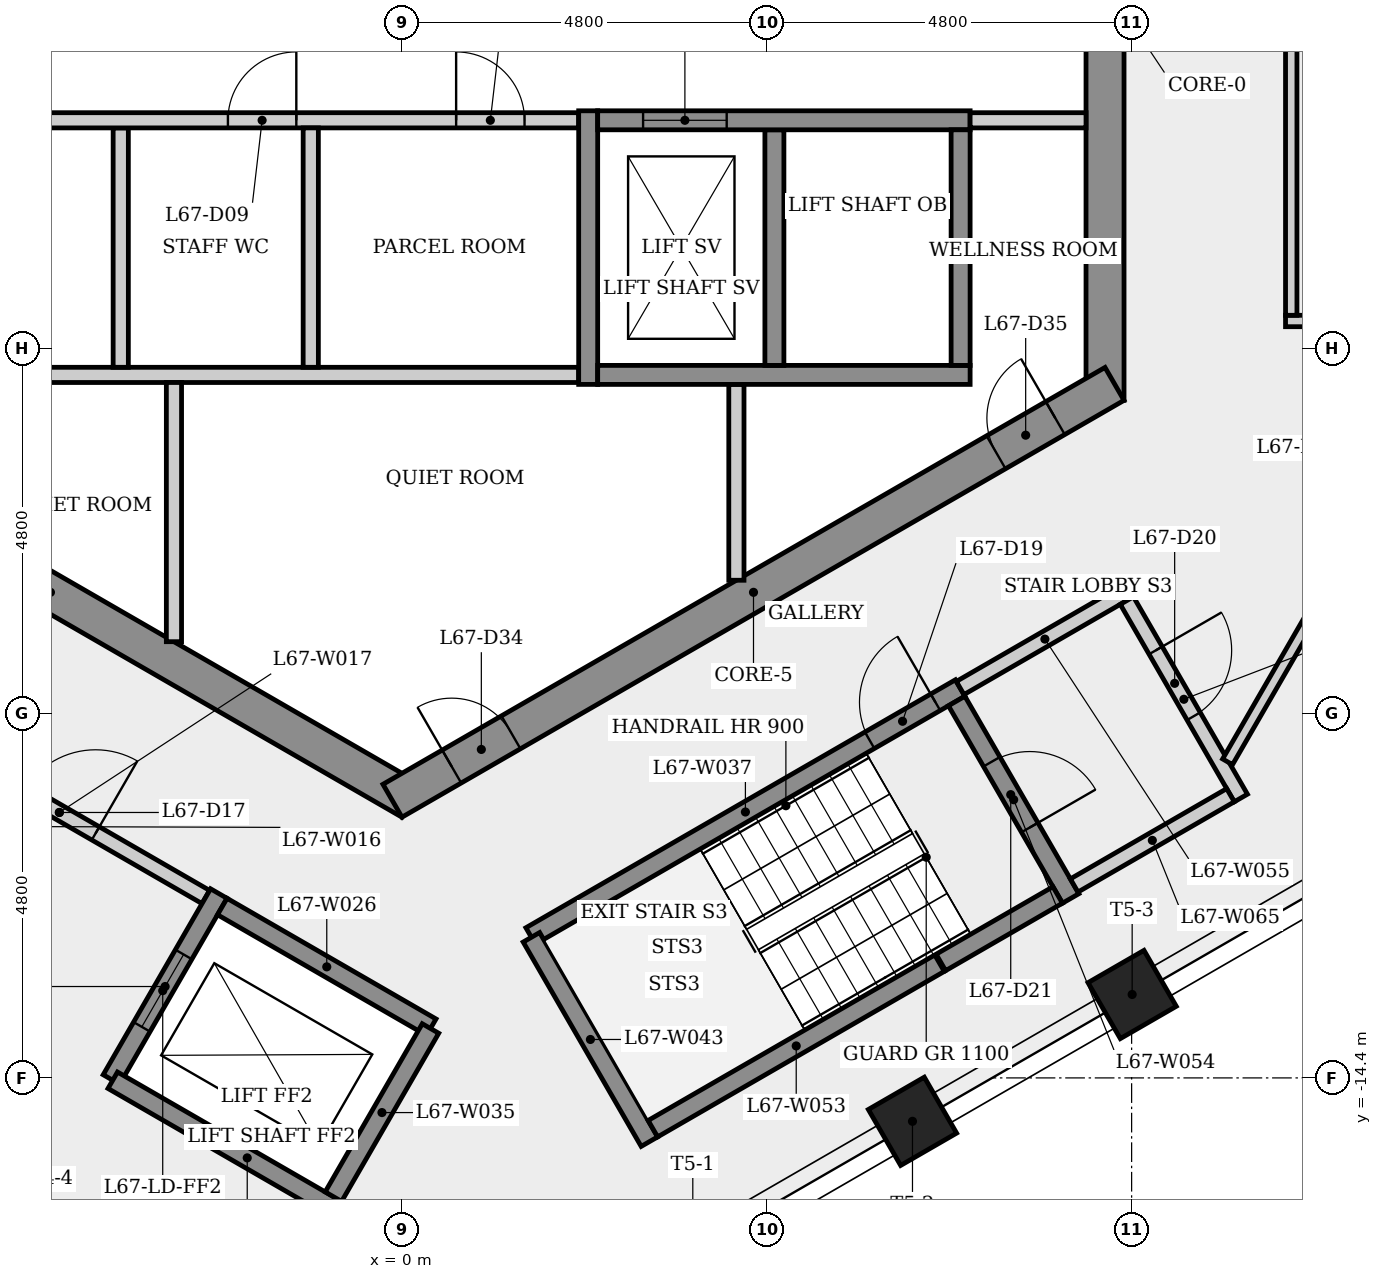
"""IFC4 building model, lengths in metres.
Left out: names, types, materials, properties, quantities, classifications, styles, units other than length and angle.
Written with IfcOpenShell. Run it as: python <this file> out.ifc"""

import sys

from ifc_helpers import new_model, si_unit, direction, frame, frame_2d, origin, origin_2d, place, context, subcontext, project, spatial, rectangle, extrude, element, fill, save


model = new_model("IFC4")
c1 = context("Model", 3, precision=1e-05, world=origin(), true_north=direction((0.0, 1.0)))
c2 = subcontext(c1, "Body", "Model", "MODEL_VIEW")
j1 = project(units=[si_unit("LENGTHUNIT", "METRE"), si_unit("PLANEANGLEUNIT", "RADIAN")], contexts=[c1])
p1 = place(None, origin())
s1 = spatial("IfcSite", under=j1, at=p1, CompositionType="ELEMENT")
p2 = place(p1, origin())
s2 = spatial("IfcBuilding", under=s1, at=p2, CompositionType="ELEMENT")
p3 = place(p2, frame((0.0, 0.0, 249.5)))
s3 = spatial("IfcBuildingStorey", under=s2, at=p3, CompositionType="ELEMENT", Elevation=249.5)
p4 = place(p3, frame((9.25, -5.485, 0.0), z_axis=(0.0, 0.0, 1.0), x_axis=(0.0, 1.0, 0.0)))
e1 = element("IfcWall", 1, at=p4, inside=s3, PredefinedType="SHEAR", context=c2, shape_type="SweptSolid", body=[
    extrude(rectangle(XDim=10.97, YDim=0.5, at=frame_2d((5.485, 0.0))), origin(), (0.0, 0.0, 1.0), 3.4),
])
p5 = place(p4, frame((4.685, 0.0, 0.0)))
e2 = element("IfcOpeningElement", 2, at=p5, cuts=e1, PredefinedType="OPENING", context=c2, shape_type="SweptSolid", body=[
    extrude(rectangle(XDim=1.6, YDim=2.1, at=frame_2d((0.8, 1.05))), frame((0.0, 0.26, 0.0), z_axis=(0.0, -1.0, 0.0), x_axis=(1.0, 0.0, 0.0)), (0.0, 0.0, 1.0), 0.52),
])
p6 = place(p3, frame((-9.375, -5.268, 0.0), z_axis=(0.0, 0.0, 1.0), x_axis=(0.866023993627, -0.500002442456, 0.0)))
e3 = element("IfcWall", 3, at=p6, inside=s3, PredefinedType="SHEAR", context=c2, shape_type="SweptSolid", body=[
    extrude(rectangle(XDim=10.97, YDim=0.5, at=frame_2d((5.485, 0.0))), origin(), (0.0, 0.0, 1.0), 3.4),
])
p7 = place(p6, frame((3.303, 0.0, 0.0)))
e4 = element("IfcOpeningElement", 4, at=p7, cuts=e3, PredefinedType="OPENING", context=c2, shape_type="SweptSolid", body=[
    extrude(rectangle(XDim=0.9, YDim=2.1, at=frame_2d((0.45, 1.05))), frame((0.0, 0.26, 0.0), z_axis=(0.0, -1.0, 0.0), x_axis=(1.0, 0.0, 0.0)), (0.0, 0.0, 1.0), 0.52),
])
p8 = place(p3, frame((-0.125, -10.753, 0.0), z_axis=(0.0, 0.0, 1.0), x_axis=(0.866023993627, 0.500002442456, 0.0)))
e5 = element("IfcWall", 5, at=p8, inside=s3, PredefinedType="SHEAR", context=c2, shape_type="SweptSolid", body=[
    extrude(rectangle(XDim=10.97, YDim=0.5, at=frame_2d((5.485, 0.0))), origin(), (0.0, 0.0, 1.0), 3.4),
])
p9 = place(p8, frame((0.9, 0.0, 0.0)))
e6 = element("IfcOpeningElement", 6, at=p9, cuts=e5, PredefinedType="OPENING", context=c2, shape_type="SweptSolid", body=[
    extrude(rectangle(XDim=0.9, YDim=2.1, at=frame_2d((0.45, 1.05))), frame((0.0, 0.26, 0.0), z_axis=(0.0, -1.0, 0.0), x_axis=(1.0, 0.0, 0.0)), (0.0, 0.0, 1.0), 0.52),
])
p10 = place(p8, frame((9.17, 0.0, 0.0)))
e7 = element("IfcOpeningElement", 7, at=p10, cuts=e5, PredefinedType="OPENING", context=c2, shape_type="SweptSolid", body=[
    extrude(rectangle(XDim=0.9, YDim=2.1, at=frame_2d((0.45, 1.05))), frame((0.0, 0.26, 0.0), z_axis=(0.0, -1.0, 0.0), x_axis=(1.0, 0.0, 0.0)), (0.0, 0.0, 1.0), 0.52),
])
for number, where, z_axis, x_axis in (
    (8, (6.717, -14.971, 0.0), (0.0, 0.0, 1.0), (0.5, -0.866, 0.0)),
    (9, (9.607, -13.302, 0.0), (0.0, 0.0, 1.0), (0.5, -0.866, 0.0)),
):
    element("IfcColumn", number, at=place(p3, frame(where, z_axis=z_axis, x_axis=x_axis)), inside=s3, PredefinedType="COLUMN", context=c2, shape_type="SweptSolid", body=[
        extrude(rectangle(XDim=0.85, YDim=0.85, at=origin_2d()), origin(), (0.0, 0.0, 1.0), 3.4),
    ])
p11 = place(p3, frame((-9.0, -5.15, 0.0), z_axis=(0.0, 0.0, 1.0), x_axis=(1.0, 0.0, 0.0)))
e10 = element("IfcWall", 10, at=p11, inside=s3, PredefinedType="PARTITIONING", context=c2, shape_type="SweptSolid", body=[
    extrude(rectangle(XDim=11.325, YDim=0.2, at=frame_2d((5.663, 0.0))), origin(), (0.0, 0.0, 1.0), 3.0),
])
p12 = place(p3, frame((-6.435, -9.795, 0.0), z_axis=(0.0, 0.0, 1.0), x_axis=(0.866012907634, -0.500021643343, 0.0)))
e11 = element("IfcWall", 11, at=p12, inside=s3, PredefinedType="PARTITIONING", context=c2, shape_type="SweptSolid", body=[
    extrude(rectangle(XDim=4.45, YDim=0.2, at=frame_2d((2.225, 0.0))), origin(), (0.0, 0.0, 1.0), 3.0),
])
p13 = place(p12, frame((1.675, 0.0, 0.0)))
e12 = element("IfcOpeningElement", 12, at=p13, cuts=e11, PredefinedType="OPENING", context=c2, shape_type="SweptSolid", body=[
    extrude(rectangle(XDim=1.1, YDim=2.1, at=frame_2d((0.55, 1.05))), frame((0.0, 0.11, 0.0), z_axis=(0.0, -1.0, 0.0), x_axis=(1.0, 0.0, 0.0)), (0.0, 0.0, 1.0), 0.22),
])
p14 = place(p3, frame((-3.7, -1.9, 0.0), z_axis=(0.0, 0.0, 1.0), x_axis=(0.0, -1.0, 0.0)))
e13 = element("IfcWall", 13, at=p14, inside=s3, PredefinedType="PARTITIONING", context=c2, shape_type="SweptSolid", body=[
    extrude(rectangle(XDim=3.15, YDim=0.2, at=frame_2d((1.575, 0.0))), origin(), (0.0, 0.0, 1.0), 3.0),
])
p15 = place(p3, frame((-9.0, -1.8, 0.0), z_axis=(0.0, 0.0, 1.0), x_axis=(1.0, 0.0, 0.0)))
e14 = element("IfcWall", 14, at=p15, inside=s3, PredefinedType="PARTITIONING", context=c2, shape_type="SweptSolid", body=[
    extrude(rectangle(XDim=11.325, YDim=0.2, at=frame_2d((5.663, 0.0))), origin(), (0.0, 0.0, 1.0), 3.0),
])
p16 = place(p15, frame((2.185, 0.0, 0.0)))
e15 = element("IfcOpeningElement", 15, at=p16, cuts=e14, PredefinedType="OPENING", context=c2, shape_type="SweptSolid", body=[
    extrude(rectangle(XDim=0.9, YDim=2.1, at=frame_2d((0.45, 1.05))), frame((0.0, 0.11, 0.0), z_axis=(0.0, -1.0, 0.0), x_axis=(1.0, 0.0, 0.0)), (0.0, 0.0, 1.0), 0.22),
])
p17 = place(p15, frame((6.71, 0.0, 0.0)))
e16 = element("IfcOpeningElement", 16, at=p17, cuts=e14, PredefinedType="OPENING", context=c2, shape_type="SweptSolid", body=[
    extrude(rectangle(XDim=0.9, YDim=2.1, at=frame_2d((0.45, 1.05))), frame((0.0, 0.11, 0.0), z_axis=(0.0, -1.0, 0.0), x_axis=(1.0, 0.0, 0.0)), (0.0, 0.0, 1.0), 0.22),
])
p18 = place(p15, frame((9.713, 0.0, 0.0)))
e17 = element("IfcOpeningElement", 17, at=p18, cuts=e14, PredefinedType="OPENING", context=c2, shape_type="SweptSolid", body=[
    extrude(rectangle(XDim=0.9, YDim=2.1, at=frame_2d((0.45, 1.05))), frame((0.0, 0.11, 0.0), z_axis=(0.0, -1.0, 0.0), x_axis=(1.0, 0.0, 0.0)), (0.0, 0.0, 1.0), 0.22),
])
p19 = place(p3, frame((-3.0, -5.25, 0.0), z_axis=(0.0, 0.0, 1.0), x_axis=(0.0, -1.0, 0.0)))
e18 = element("IfcWall", 18, at=p19, inside=s3, PredefinedType="PARTITIONING", context=c2, shape_type="SweptSolid", body=[
    extrude(rectangle(XDim=3.41, YDim=0.2, at=frame_2d((1.705, 0.0))), origin(), (0.0, 0.0, 1.0), 3.0),
])
p20 = place(p3, frame((-2.41, -11.974, 0.0), z_axis=(0.0, 0.0, 1.0), x_axis=(-0.49998675294, -0.866033051843, 0.0)))
e19 = element("IfcWall", 19, at=p20, inside=s3, PredefinedType="SHEAR", context=c2, shape_type="SweptSolid", body=[
    extrude(rectangle(XDim=2.825, YDim=0.25, at=frame_2d((1.413, 0.0))), origin(), (0.0, 0.0, 1.0), 3.0),
])
p21 = place(p20, frame((0.926, 0.0, 0.0)))
e20 = element("IfcOpeningElement", 20, at=p21, cuts=e19, PredefinedType="OPENING", context=c2, shape_type="SweptSolid", body=[
    extrude(rectangle(XDim=1.1, YDim=2.1, at=frame_2d((0.55, 1.05))), frame((0.0, 0.135, 0.0), z_axis=(0.0, -1.0, 0.0), x_axis=(1.0, 0.0, 0.0)), (0.0, 0.0, 1.0), 0.27),
])
p22 = place(p3, frame((-2.364, -12.145, 0.0), z_axis=(0.0, 0.0, 1.0), x_axis=(0.866048579423, -0.499959856469, 0.0)))
e21 = element("IfcWall", 21, at=p22, inside=s3, PredefinedType="SHEAR", context=c2, shape_type="SweptSolid", body=[
    extrude(rectangle(XDim=3.175, YDim=0.25, at=frame_2d((1.587, 0.0))), origin(), (0.0, 0.0, 1.0), 3.4),
])
p23 = place(p3, frame((-1.2, -1.9, 0.0), z_axis=(0.0, 0.0, 1.0), x_axis=(0.0, -1.0, 0.0)))
e22 = element("IfcWall", 22, at=p23, inside=s3, PredefinedType="PARTITIONING", context=c2, shape_type="SweptSolid", body=[
    extrude(rectangle(XDim=3.15, YDim=0.2, at=frame_2d((1.575, 0.0))), origin(), (0.0, 0.0, 1.0), 3.0),
])
p24 = place(p3, frame((-0.856, -16.133, 0.0), z_axis=(0.0, 0.0, 1.0), x_axis=(-0.866032748241, 0.499987278812, 0.0)))
e23 = element("IfcWall", 23, at=p24, inside=s3, PredefinedType="SHEAR", context=c2, shape_type="SweptSolid", body=[
    extrude(rectangle(XDim=3.405, YDim=0.25, at=frame_2d((1.702, 0.0))), origin(), (0.0, 0.0, 1.0), 3.0),
])
p25 = place(p3, frame((0.375, -13.75, 0.0), z_axis=(0.0, 0.0, 1.0), x_axis=(-0.50003400563, -0.866005769735, 0.0)))
e24 = element("IfcWall", 24, at=p25, inside=s3, PredefinedType="SHEAR", context=c2, shape_type="SweptSolid", body=[
    extrude(rectangle(XDim=2.555, YDim=0.25, at=frame_2d((1.277, 0.0))), origin(), (0.0, 0.0, 1.0), 3.4),
])
p26 = place(p3, frame((1.693, -12.532, 0.0), z_axis=(0.0, 0.0, 1.0), x_axis=(0.866031063448, 0.499990197047, 0.0)))
e25 = element("IfcWall", 25, at=p26, inside=s3, PredefinedType="SHEAR", context=c2, shape_type="SweptSolid", body=[
    extrude(rectangle(XDim=6.525, YDim=0.25, at=frame_2d((3.263, 0.0))), origin(), (0.0, 0.0, 1.0), 3.0),
])
p27 = place(p26, frame((5.15, 0.0, 0.0)))
e26 = element("IfcOpeningElement", 26, at=p27, cuts=e25, PredefinedType="OPENING", context=c2, shape_type="SweptSolid", body=[
    extrude(rectangle(XDim=1.0, YDim=2.1, at=frame_2d((0.5, 1.05))), frame((0.0, 0.135, 0.0), z_axis=(0.0, -1.0, 0.0), x_axis=(1.0, 0.0, 0.0)), (0.0, 0.0, 1.0), 0.27),
])
p28 = place(p3, frame((2.45, -5.275, 0.0), z_axis=(0.0, 0.0, 1.0), x_axis=(0.0, 1.0, 0.0)))
e27 = element("IfcWall", 27, at=p28, inside=s3, PredefinedType="SHEAR", context=c2, shape_type="SweptSolid", body=[
    extrude(rectangle(XDim=3.6, YDim=0.25, at=frame_2d((1.8, 0.0))), origin(), (0.0, 0.0, 1.0), 3.0),
])
p29 = place(p3, frame((3.256, -15.239, 0.0), z_axis=(0.0, 0.0, 1.0), x_axis=(-0.500003782172, 0.866023220135, 0.0)))
e28 = element("IfcWall", 28, at=p29, inside=s3, PredefinedType="SHEAR", context=c2, shape_type="SweptSolid", body=[
    extrude(rectangle(XDim=3.105, YDim=0.25, at=frame_2d((1.552, 0.0))), origin(), (0.0, 0.0, 1.0), 3.0),
])
p30 = place(p3, frame((4.4, -5.275, 0.0), z_axis=(0.0, 0.0, 1.0), x_axis=(0.0, -1.0, 0.0)))
e29 = element("IfcWall", 29, at=p30, inside=s3, PredefinedType="PARTITIONING", context=c2, shape_type="SweptSolid", body=[
    extrude(rectangle(XDim=2.577, YDim=0.2, at=frame_2d((1.289, 0.0))), origin(), (0.0, 0.0, 1.0), 3.0),
])
p31 = place(p3, frame((2.575, -5.15, 0.0), z_axis=(0.0, 0.0, 1.0), x_axis=(1.0, 0.0, 0.0)))
e30 = element("IfcWall", 30, at=p31, inside=s3, PredefinedType="SHEAR", context=c2, shape_type="SweptSolid", body=[
    extrude(rectangle(XDim=4.9, YDim=0.25, at=frame_2d((2.45, 0.0))), origin(), (0.0, 0.0, 1.0), 3.0),
])
p32 = place(p3, frame((4.9, -1.925, 0.0), z_axis=(0.0, 0.0, 1.0), x_axis=(0.0, -1.0, 0.0)))
e31 = element("IfcWall", 31, at=p32, inside=s3, PredefinedType="SHEAR", context=c2, shape_type="SweptSolid", body=[
    extrude(rectangle(XDim=3.1, YDim=0.25, at=frame_2d((1.55, 0.0))), origin(), (0.0, 0.0, 1.0), 3.4),
])
p33 = place(p3, frame((2.575, -1.8, 0.0), z_axis=(0.0, 0.0, 1.0), x_axis=(1.0, 0.0, 0.0)))
e32 = element("IfcWall", 32, at=p33, inside=s3, PredefinedType="SHEAR", context=c2, shape_type="SweptSolid", body=[
    extrude(rectangle(XDim=4.9, YDim=0.25, at=frame_2d((2.45, 0.0))), origin(), (0.0, 0.0, 1.0), 3.0),
])
p34 = place(p33, frame((0.597, 0.0, 0.0)))
e33 = element("IfcOpeningElement", 33, at=p34, cuts=e32, PredefinedType="OPENING", context=c2, shape_type="SweptSolid", body=[
    extrude(rectangle(XDim=1.1, YDim=2.1, at=frame_2d((0.55, 1.05))), frame((0.0, 0.135, 0.0), z_axis=(0.0, -1.0, 0.0), x_axis=(1.0, 0.0, 0.0)), (0.0, 0.0, 1.0), 0.27),
])
p35 = place(p3, frame((7.073, -12.891, 0.0), z_axis=(0.0, 0.0, 1.0), x_axis=(-0.866023145199, -0.500003911965, 0.0)))
e34 = element("IfcWall", 34, at=p35, inside=s3, PredefinedType="SHEAR", context=c2, shape_type="SweptSolid", body=[
    extrude(rectangle(XDim=4.355, YDim=0.25, at=frame_2d((2.177, 0.0))), origin(), (0.0, 0.0, 1.0), 3.0),
])
p36 = place(p3, frame((7.298, -9.441, 0.0), z_axis=(0.0, 0.0, 1.0), x_axis=(0.50002537861, -0.866010750942, 0.0)))
e35 = element("IfcWall", 35, at=p36, inside=s3, PredefinedType="SHEAR", context=c2, shape_type="SweptSolid", body=[
    extrude(rectangle(XDim=3.0, YDim=0.25, at=frame_2d((1.5, 0.0))), origin(), (0.0, 0.0, 1.0), 3.0),
])
p37 = place(p36, frame((0.923, 0.0, 0.0)))
e36 = element("IfcOpeningElement", 36, at=p37, cuts=e35, PredefinedType="OPENING", context=c2, shape_type="SweptSolid", body=[
    extrude(rectangle(XDim=1.0, YDim=2.1, at=frame_2d((0.5, 1.05))), frame((0.0, 0.135, 0.0), z_axis=(0.0, -1.0, 0.0), x_axis=(1.0, 0.0, 0.0)), (0.0, 0.0, 1.0), 0.27),
])
p38 = place(p3, frame((7.344, -9.27, 0.0), z_axis=(0.0, 0.0, 1.0), x_axis=(0.866005588531, 0.500034319456, 0.0)))
e37 = element("IfcWall", 37, at=p38, inside=s3, PredefinedType="PARTITIONING", context=c2, shape_type="SweptSolid", body=[
    extrude(rectangle(XDim=2.575, YDim=0.2, at=frame_2d((1.288, 0.0))), origin(), (0.0, 0.0, 1.0), 3.0),
])
p39 = place(p3, frame((7.35, -1.925, 0.0), z_axis=(0.0, 0.0, 1.0), x_axis=(0.0, -1.0, 0.0)))
e38 = element("IfcWall", 38, at=p39, inside=s3, PredefinedType="SHEAR", context=c2, shape_type="SweptSolid", body=[
    extrude(rectangle(XDim=3.1, YDim=0.25, at=frame_2d((1.55, 0.0))), origin(), (0.0, 0.0, 1.0), 3.4),
])
p40 = place(p3, frame((8.627, -11.993, 0.0), z_axis=(0.0, 0.0, 1.0), x_axis=(-0.866059624469, -0.499940723351, 0.0)))
e39 = element("IfcWall", 39, at=p40, inside=s3, PredefinedType="SHEAR", context=c2, shape_type="SweptSolid", body=[
    extrude(rectangle(XDim=1.775, YDim=0.25, at=frame_2d((0.888, 0.0))), origin(), (0.0, 0.0, 1.0), 3.0),
])
p41 = place(p3, frame((9.0, -1.8, 0.0), z_axis=(0.0, 0.0, 1.0), x_axis=(-1.0, 0.0, 0.0)))
e40 = element("IfcWall", 40, at=p41, inside=s3, PredefinedType="PARTITIONING", context=c2, shape_type="SweptSolid", body=[
    extrude(rectangle(XDim=1.525, YDim=0.2, at=frame_2d((0.763, 0.0))), origin(), (0.0, 0.0, 1.0), 3.0),
])
p42 = place(p3, frame((9.537, -8.119, 0.0), z_axis=(0.0, 0.0, 1.0), x_axis=(0.499990139034, -0.866031096941, 0.0)))
e41 = element("IfcWall", 41, at=p42, inside=s3, PredefinedType="PARTITIONING", context=c2, shape_type="SweptSolid", body=[
    extrude(rectangle(XDim=3.0, YDim=0.2, at=frame_2d((1.5, 0.0))), origin(), (0.0, 0.0, 1.0), 3.0),
])
p43 = place(p42, frame((0.758, 0.0, 0.0)))
e42 = element("IfcOpeningElement", 42, at=p43, cuts=e41, PredefinedType="OPENING", context=c2, shape_type="SweptSolid", body=[
    extrude(rectangle(XDim=1.0, YDim=2.1, at=frame_2d((0.5, 1.05))), frame((0.0, 0.11, 0.0), z_axis=(0.0, -1.0, 0.0), x_axis=(1.0, 0.0, 0.0)), (0.0, 0.0, 1.0), 0.22),
])
p44 = place(p3, frame((10.901, -10.681, 0.0), z_axis=(0.0, 0.0, 1.0), x_axis=(-0.866007538022, -0.500030943131, 0.0)))
e43 = element("IfcWall", 43, at=p44, inside=s3, PredefinedType="PARTITIONING", context=c2, shape_type="SweptSolid", body=[
    extrude(rectangle(XDim=2.375, YDim=0.2, at=frame_2d((1.188, 0.0))), origin(), (0.0, 0.0, 1.0), 3.0),
])
p45 = place(p3, frame((11.625, -4.441, 0.0), z_axis=(0.0, 0.0, 1.0), x_axis=(1.0, 0.0, 0.0)))
e44 = element("IfcWall", 44, at=p45, inside=s3, PredefinedType="PARTITIONING", context=c2, shape_type="SweptSolid", body=[
    extrude(rectangle(XDim=2.661, YDim=0.15, at=frame_2d((1.331, 0.0))), origin(), (0.0, 0.0, 1.0), 3.0),
])
p46 = place(p3, frame((11.7, 4.516, 0.0), z_axis=(0.0, 0.0, 1.0), x_axis=(0.0, -1.0, 0.0)))
e45 = element("IfcWall", 45, at=p46, inside=s3, PredefinedType="PARTITIONING", context=c2, shape_type="SweptSolid", body=[
    extrude(rectangle(XDim=8.881, YDim=0.15, at=frame_2d((4.441, 0.0))), origin(), (0.0, 0.0, 1.0), 3.0),
])
p47 = place(p46, frame((3.993, 0.0, 0.0)))
e46 = element("IfcOpeningElement", 46, at=p47, cuts=e45, PredefinedType="OPENING", context=c2, shape_type="SweptSolid", body=[
    extrude(rectangle(XDim=1.0, YDim=2.1, at=frame_2d((0.5, 1.05))), frame((0.0, 0.085, 0.0), z_axis=(0.0, -1.0, 0.0), x_axis=(1.0, 0.0, 0.0)), (0.0, 0.0, 1.0), 0.17),
])
p48 = place(p3, frame((14.174, -4.506, 0.0), z_axis=(0.0, 0.0, 1.0), x_axis=(-0.499996888874, -0.866027199987, 0.0)))
e47 = element("IfcWall", 47, at=p48, inside=s3, PredefinedType="PARTITIONING", context=c2, shape_type="SweptSolid", body=[
    extrude(rectangle(XDim=6.623, YDim=0.15, at=frame_2d((3.311, 0.0))), origin(), (0.0, 0.0, 1.0), 3.0),
])
p49 = place(p48, frame((2.811, 0.0, 0.0)))
e48 = element("IfcOpeningElement", 48, at=p49, cuts=e47, PredefinedType="OPENING", context=c2, shape_type="SweptSolid", body=[
    extrude(rectangle(XDim=1.0, YDim=2.1, at=frame_2d((0.5, 1.05))), frame((0.0, 0.085, 0.0), z_axis=(0.0, -1.0, 0.0), x_axis=(1.0, 0.0, 0.0)), (0.0, 0.0, 1.0), 0.17),
])
p50 = place(p34, origin())
e49 = element("IfcDoor", 49, at=p50, inside=s3, OperationType="SLIDING_TO_LEFT", PredefinedType="DOOR", context=c2, shape_type="SweptSolid", body=[
    extrude(rectangle(XDim=1.1, YDim=2.1, at=frame_2d((0.55, 1.05))), frame((0.0, 0.025, 0.0), z_axis=(0.0, -1.0, 0.0), x_axis=(1.0, 0.0, 0.0)), (0.0, 0.0, 1.0), 0.05),
])
fill(e33, e49)
p51 = place(p17, origin())
e50 = element("IfcDoor", 50, at=p51, inside=s3, OperationType="SINGLE_SWING_RIGHT", PredefinedType="DOOR", context=c2, shape_type="SweptSolid", body=[
    extrude(rectangle(XDim=0.9, YDim=2.1, at=frame_2d((0.45, 1.05))), frame((0.0, 0.025, 0.0), z_axis=(0.0, -1.0, 0.0), x_axis=(1.0, 0.0, 0.0)), (0.0, 0.0, 1.0), 0.05),
])
fill(e16, e50)
p52 = place(p18, origin())
e51 = element("IfcDoor", 51, at=p52, inside=s3, OperationType="SINGLE_SWING_LEFT", PredefinedType="DOOR", context=c2, shape_type="SweptSolid", body=[
    extrude(rectangle(XDim=0.9, YDim=2.1, at=frame_2d((0.45, 1.05))), frame((0.0, 0.025, 0.0), z_axis=(0.0, -1.0, 0.0), x_axis=(1.0, 0.0, 0.0)), (0.0, 0.0, 1.0), 0.05),
])
fill(e17, e51)
p53 = place(p13, origin())
e52 = element("IfcDoor", 52, at=p53, inside=s3, OperationType="SINGLE_SWING_RIGHT", PredefinedType="DOOR", context=c2, shape_type="SweptSolid", body=[
    extrude(rectangle(XDim=1.1, YDim=2.1, at=frame_2d((0.55, 1.05))), frame((0.0, 0.025, 0.0), z_axis=(0.0, -1.0, 0.0), x_axis=(1.0, 0.0, 0.0)), (0.0, 0.0, 1.0), 0.05),
])
fill(e12, e52)
p54 = place(p21, origin())
e53 = element("IfcDoor", 53, at=p54, inside=s3, OperationType="SLIDING_TO_LEFT", PredefinedType="DOOR", context=c2, shape_type="SweptSolid", body=[
    extrude(rectangle(XDim=1.1, YDim=2.1, at=frame_2d((0.55, 1.05))), frame((0.0, 0.025, 0.0), z_axis=(0.0, -1.0, 0.0), x_axis=(1.0, 0.0, 0.0)), (0.0, 0.0, 1.0), 0.05),
])
fill(e20, e53)
p55 = place(p27, origin())
e54 = element("IfcDoor", 54, at=p55, inside=s3, OperationType="SINGLE_SWING_RIGHT", PredefinedType="DOOR", context=c2, shape_type="SweptSolid", body=[
    extrude(rectangle(XDim=1.0, YDim=2.1, at=frame_2d((0.5, 1.05))), frame((0.0, 0.025, 0.0), z_axis=(0.0, -1.0, 0.0), x_axis=(1.0, 0.0, 0.0)), (0.0, 0.0, 1.0), 0.05),
])
fill(e26, e54)
p56 = place(p43, origin())
e55 = element("IfcDoor", 55, at=p56, inside=s3, OperationType="SINGLE_SWING_LEFT", PredefinedType="DOOR", context=c2, shape_type="SweptSolid", body=[
    extrude(rectangle(XDim=1.0, YDim=2.1, at=frame_2d((0.5, 1.05))), frame((0.0, 0.025, 0.0), z_axis=(0.0, -1.0, 0.0), x_axis=(1.0, 0.0, 0.0)), (0.0, 0.0, 1.0), 0.05),
])
fill(e42, e55)
p57 = place(p37, origin())
e56 = element("IfcDoor", 56, at=p57, inside=s3, OperationType="SINGLE_SWING_RIGHT", PredefinedType="DOOR", context=c2, shape_type="SweptSolid", body=[
    extrude(rectangle(XDim=1.0, YDim=2.1, at=frame_2d((0.5, 1.05))), frame((0.0, 0.025, 0.0), z_axis=(0.0, -1.0, 0.0), x_axis=(1.0, 0.0, 0.0)), (0.0, 0.0, 1.0), 0.05),
])
fill(e36, e56)
p58 = place(p9, origin())
e57 = element("IfcDoor", 57, at=p58, inside=s3, OperationType="SINGLE_SWING_LEFT", PredefinedType="DOOR", context=c2, shape_type="SweptSolid", body=[
    extrude(rectangle(XDim=0.9, YDim=2.1, at=frame_2d((0.45, 1.05))), frame((0.0, 0.025, 0.0), z_axis=(0.0, -1.0, 0.0), x_axis=(1.0, 0.0, 0.0)), (0.0, 0.0, 1.0), 0.05),
])
fill(e6, e57)
p59 = place(p10, origin())
e58 = element("IfcDoor", 58, at=p59, inside=s3, OperationType="SINGLE_SWING_RIGHT", PredefinedType="DOOR", context=c2, shape_type="SweptSolid", body=[
    extrude(rectangle(XDim=0.9, YDim=2.1, at=frame_2d((0.45, 1.05))), frame((0.0, 0.025, 0.0), z_axis=(0.0, -1.0, 0.0), x_axis=(1.0, 0.0, 0.0)), (0.0, 0.0, 1.0), 0.05),
])
fill(e7, e58)
save(model, sys.argv[1])
